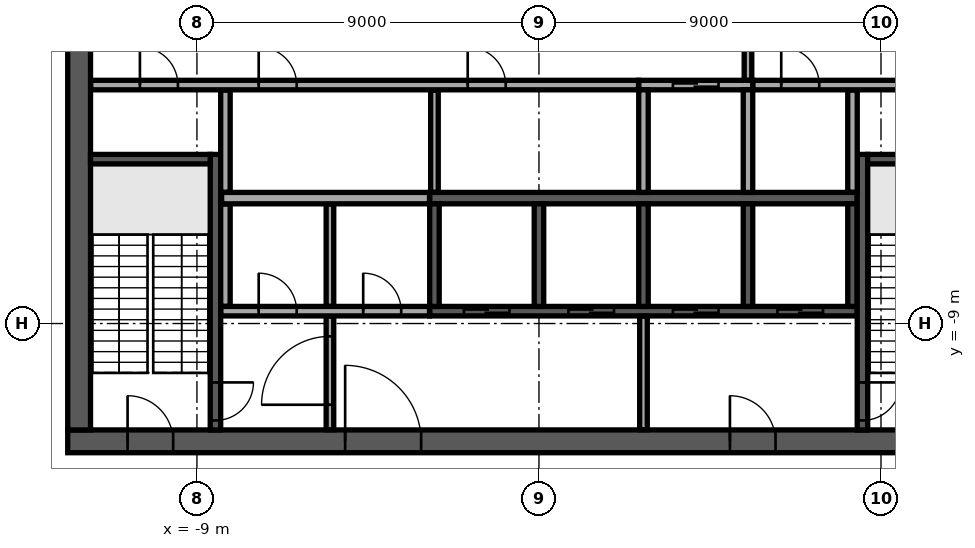
"""IFC4 building model, lengths in metres.
Left out: names, types, materials, properties, quantities, classifications, styles, units other than length and angle.
Written with IfcOpenShell. Run it as: python <this file> out.ifc"""

import sys

from ifc_helpers import new_model, si_unit, direction, frame, frame_2d, origin, place, context, subcontext, project, spatial, rectangle, extrude, element, fill, save


model = new_model("IFC4")
c1 = context("Model", 3, precision=1e-05, world=origin(), true_north=direction((0.0, 1.0)))
c2 = subcontext(c1, "Body", "Model", "MODEL_VIEW")
j1 = project(units=[si_unit("LENGTHUNIT", "METRE"), si_unit("PLANEANGLEUNIT", "RADIAN")], contexts=[c1])
p1 = place(None, origin())
s1 = spatial("IfcSite", under=j1, at=p1, CompositionType="ELEMENT")
p2 = place(p1, origin())
s2 = spatial("IfcBuilding", under=s1, at=p2, CompositionType="ELEMENT")
p3 = place(p2, frame((0.0, 0.0, 368.1)))
s3 = spatial("IfcBuildingStorey", under=s2, at=p3, CompositionType="ELEMENT", Elevation=368.1)
p4 = place(p3, frame((-12.4, -12.1, 0.0), z_axis=(0.0, 0.0, 1.0), x_axis=(1.0, 0.0, 0.0)))
e1 = element("IfcWall", 1, at=p4, inside=s3, PredefinedType="SHEAR", context=c2, shape_type="SweptSolid", body=[
    extrude(rectangle(XDim=24.8, YDim=0.6, at=frame_2d((12.4, 0.0))), origin(), (0.0, 0.0, 1.0), 4.7),
])
p5 = place(p4, frame((7.3, 0.0, 0.0)))
e2 = element("IfcOpeningElement", 2, at=p5, cuts=e1, PredefinedType="OPENING", context=c2, shape_type="SweptSolid", body=[
    extrude(rectangle(XDim=2.0, YDim=2.1, at=frame_2d((1.0, 1.05))), frame((0.0, 0.31, 0.0), z_axis=(0.0, -1.0, 0.0), x_axis=(1.0, 0.0, 0.0)), (0.0, 0.0, 1.0), 0.62),
])
p6 = place(p4, frame((17.425, 0.0, 0.0)))
e3 = element("IfcOpeningElement", 3, at=p6, cuts=e1, PredefinedType="OPENING", context=c2, shape_type="SweptSolid", body=[
    extrude(rectangle(XDim=1.2, YDim=2.1, at=frame_2d((0.6, 1.05))), frame((0.0, 0.31, 0.0), z_axis=(0.0, -1.0, 0.0), x_axis=(1.0, 0.0, 0.0)), (0.0, 0.0, 1.0), 0.62),
])
p7 = place(p4, frame((1.575, 0.0, 0.0)))
e4 = element("IfcOpeningElement", 4, at=p7, cuts=e1, PredefinedType="OPENING", context=c2, shape_type="SweptSolid", body=[
    extrude(rectangle(XDim=1.2, YDim=2.1, at=frame_2d((0.6, 1.05))), frame((0.0, 0.31, 0.0), z_axis=(0.0, -1.0, 0.0), x_axis=(1.0, 0.0, 0.0)), (0.0, 0.0, 1.0), 0.62),
])
p8 = place(p4, frame((22.025, 0.0, 0.0)))
e5 = element("IfcOpeningElement", 5, at=p8, cuts=e1, PredefinedType="OPENING", context=c2, shape_type="SweptSolid", body=[
    extrude(rectangle(XDim=1.2, YDim=2.1, at=frame_2d((0.6, 1.05))), frame((0.0, 0.31, 0.0), z_axis=(0.0, -1.0, 0.0), x_axis=(1.0, 0.0, 0.0)), (0.0, 0.0, 1.0), 0.62),
])
p9 = place(p3, frame((-12.1, -11.8, 0.0), z_axis=(0.0, 0.0, 1.0), x_axis=(0.0, 1.0, 0.0)))
e6 = element("IfcWall", 6, at=p9, inside=s3, PredefinedType="SHEAR", context=c2, shape_type="SweptSolid", body=[
    extrude(rectangle(XDim=23.6, YDim=0.6, at=frame_2d((11.8, 0.0))), origin(), (0.0, 0.0, 1.0), 4.7),
])
p10 = place(p9, frame((10.6, 0.0, 0.0)))
e7 = element("IfcOpeningElement", 7, at=p10, cuts=e6, PredefinedType="OPENING", context=c2, shape_type="SweptSolid", body=[
    extrude(rectangle(XDim=2.4, YDim=2.4, at=frame_2d((1.2, 1.2))), frame((0.0, 0.31, 0.0), z_axis=(0.0, -1.0, 0.0), x_axis=(1.0, 0.0, 0.0)), (0.0, 0.0, 1.0), 0.62),
])
p11 = place(p3, frame((-2.875, -5.7, 0.0), z_axis=(0.0, 0.0, 1.0), x_axis=(1.0, 0.0, 0.0)))
e8 = element("IfcWall", 8, at=p11, inside=s3, PredefinedType="SOLIDWALL", context=c2, shape_type="SweptSolid", body=[
    extrude(rectangle(XDim=11.25, YDim=0.3, at=frame_2d((5.625, 0.0))), origin(), (0.0, 0.0, 1.0), 4.7),
])
p12 = place(p3, frame((2.625, -2.725, 0.0), z_axis=(0.0, 0.0, 1.0), x_axis=(1.0, 0.0, 0.0)))
e9 = element("IfcWall", 9, at=p12, inside=s3, PredefinedType="SOLIDWALL", context=c2, shape_type="SweptSolid", body=[
    extrude(rectangle(XDim=3.0, YDim=0.25, at=frame_2d((1.5, 0.0))), origin(), (0.0, 0.0, 1.0), 4.7),
])
p13 = place(p12, frame((0.9, 0.0, 0.0)))
e10 = element("IfcOpeningElement", 10, at=p13, cuts=e9, PredefinedType="OPENING", context=c2, shape_type="SweptSolid", body=[
    extrude(rectangle(XDim=1.2, YDim=2.1, at=frame_2d((0.6, 1.05))), frame((0.0, 0.135, 0.0), z_axis=(0.0, -1.0, 0.0), x_axis=(1.0, 0.0, 0.0)), (0.0, 0.0, 1.0), 0.27),
])
for number, where, z_axis, x_axis in (
    (11, (2.75, -5.55, 0.0), (0.0, 0.0, 1.0), (0.0, 1.0, 0.0)),
    (12, (5.5, -5.55, 0.0), (0.0, 0.0, 1.0), (0.0, 1.0, 0.0)),
):
    element("IfcWall", number, at=place(p3, frame(where, z_axis=z_axis, x_axis=x_axis)), inside=s3, PredefinedType="SOLIDWALL", context=c2, shape_type="SweptSolid", body=[
        extrude(rectangle(XDim=2.7, YDim=0.25, at=frame_2d((1.35, 0.0))), origin(), (0.0, 0.0, 1.0), 4.7),
    ])
p14 = place(p3, frame((-2.875, -8.675, 0.0), z_axis=(0.0, 0.0, 1.0), x_axis=(1.0, 0.0, 0.0)))
e13 = element("IfcWall", 13, at=p14, inside=s3, PredefinedType="SOLIDWALL", context=c2, shape_type="SweptSolid", body=[
    extrude(rectangle(XDim=11.25, YDim=0.25, at=frame_2d((5.625, 0.0))), origin(), (0.0, 0.0, 1.0), 4.7),
])
p15 = place(p14, frame((0.9, 0.0, 0.0)))
e14 = element("IfcOpeningElement", 14, at=p15, cuts=e13, PredefinedType="OPENING", context=c2, shape_type="SweptSolid", body=[
    extrude(rectangle(XDim=1.2, YDim=2.1, at=frame_2d((0.6, 1.05))), frame((0.0, 0.135, 0.0), z_axis=(0.0, -1.0, 0.0), x_axis=(1.0, 0.0, 0.0)), (0.0, 0.0, 1.0), 0.27),
])
p16 = place(p14, frame((3.65, 0.0, 0.0)))
e15 = element("IfcOpeningElement", 15, at=p16, cuts=e13, PredefinedType="OPENING", context=c2, shape_type="SweptSolid", body=[
    extrude(rectangle(XDim=1.2, YDim=2.1, at=frame_2d((0.6, 1.05))), frame((0.0, 0.135, 0.0), z_axis=(0.0, -1.0, 0.0), x_axis=(1.0, 0.0, 0.0)), (0.0, 0.0, 1.0), 0.27),
])
p17 = place(p14, frame((6.4, 0.0, 0.0)))
e16 = element("IfcOpeningElement", 16, at=p17, cuts=e13, PredefinedType="OPENING", context=c2, shape_type="SweptSolid", body=[
    extrude(rectangle(XDim=1.2, YDim=2.1, at=frame_2d((0.6, 1.05))), frame((0.0, 0.135, 0.0), z_axis=(0.0, -1.0, 0.0), x_axis=(1.0, 0.0, 0.0)), (0.0, 0.0, 1.0), 0.27),
])
p18 = place(p14, frame((9.15, 0.0, 0.0)))
e17 = element("IfcOpeningElement", 17, at=p18, cuts=e13, PredefinedType="OPENING", context=c2, shape_type="SweptSolid", body=[
    extrude(rectangle(XDim=1.2, YDim=2.1, at=frame_2d((0.6, 1.05))), frame((0.0, 0.135, 0.0), z_axis=(0.0, -1.0, 0.0), x_axis=(1.0, 0.0, 0.0)), (0.0, 0.0, 1.0), 0.27),
])
for number, where, z_axis, x_axis in (
    (18, (-2.75, -8.55, 0.0), (0.0, 0.0, 1.0), (0.0, 1.0, 0.0)),
    (19, (0.0, -8.55, 0.0), (0.0, 0.0, 1.0), (0.0, 1.0, 0.0)),
    (20, (2.75, -8.55, 0.0), (0.0, 0.0, 1.0), (0.0, 1.0, 0.0)),
    (21, (5.5, -8.55, 0.0), (0.0, 0.0, 1.0), (0.0, 1.0, 0.0)),
    (22, (8.25, -8.55, 0.0), (0.0, 0.0, 1.0), (0.0, 1.0, 0.0)),
):
    element("IfcWall", number, at=place(p3, frame(where, z_axis=z_axis, x_axis=x_axis)), inside=s3, PredefinedType="SOLIDWALL", context=c2, shape_type="SweptSolid", body=[
        extrude(rectangle(XDim=2.7, YDim=0.25, at=frame_2d((1.35, 0.0))), origin(), (0.0, 0.0, 1.0), 4.7),
    ])
p19 = place(p3, frame((-8.512, -4.55, 0.0), z_axis=(0.0, 0.0, 1.0), x_axis=(0.0, -1.0, 0.0)))
e23 = element("IfcWall", 23, at=p19, inside=s3, PredefinedType="SOLIDWALL", context=c2, shape_type="SweptSolid", body=[
    extrude(rectangle(XDim=7.25, YDim=0.275, at=frame_2d((3.625, 0.0))), origin(), (0.0, 0.0, 1.0), 4.7),
])
p20 = place(p19, frame((6.0, 0.0, 0.0)))
e24 = element("IfcOpeningElement", 24, at=p20, cuts=e23, PredefinedType="OPENING", context=c2, shape_type="SweptSolid", body=[
    extrude(rectangle(XDim=1.0, YDim=2.1, at=frame_2d((0.5, 1.05))), frame((0.0, 0.147, 0.0), z_axis=(0.0, -1.0, 0.0), x_axis=(1.0, 0.0, 0.0)), (0.0, 0.0, 1.0), 0.295),
])
p21 = place(p3, frame((-8.65, -4.675, 0.0), z_axis=(0.0, 0.0, 1.0), x_axis=(-1.0, 0.0, 0.0)))
e25 = element("IfcWall", 25, at=p21, inside=s3, PredefinedType="SOLIDWALL", context=c2, shape_type="SweptSolid", body=[
    extrude(rectangle(XDim=3.15, YDim=0.25, at=frame_2d((1.575, 0.0))), origin(), (0.0, 0.0, 1.0), 4.7),
])
p22 = place(p3, frame((8.512, -4.55, 0.0), z_axis=(0.0, 0.0, 1.0), x_axis=(0.0, -1.0, 0.0)))
e26 = element("IfcWall", 26, at=p22, inside=s3, PredefinedType="SOLIDWALL", context=c2, shape_type="SweptSolid", body=[
    extrude(rectangle(XDim=7.25, YDim=0.275, at=frame_2d((3.625, 0.0))), origin(), (0.0, 0.0, 1.0), 4.7),
])
p23 = place(p22, frame((6.0, 0.0, 0.0)))
e27 = element("IfcOpeningElement", 27, at=p23, cuts=e26, PredefinedType="OPENING", context=c2, shape_type="SweptSolid", body=[
    extrude(rectangle(XDim=1.0, YDim=2.1, at=frame_2d((0.5, 1.05))), frame((0.0, 0.147, 0.0), z_axis=(0.0, -1.0, 0.0), x_axis=(1.0, 0.0, 0.0)), (0.0, 0.0, 1.0), 0.295),
])
p24 = place(p3, frame((8.65, -4.675, 0.0), z_axis=(0.0, 0.0, 1.0), x_axis=(1.0, 0.0, 0.0)))
e28 = element("IfcWall", 28, at=p24, inside=s3, PredefinedType="SOLIDWALL", context=c2, shape_type="SweptSolid", body=[
    extrude(rectangle(XDim=3.15, YDim=0.25, at=frame_2d((1.575, 0.0))), origin(), (0.0, 0.0, 1.0), 4.7),
])
p25 = place(p3, frame((-5.5, -11.795, 0.0), z_axis=(0.0, 0.0, 1.0), x_axis=(0.0, 1.0, 0.0)))
e29 = element("IfcWall", 29, at=p25, inside=s3, PredefinedType="PARTITIONING", context=c2, shape_type="SweptSolid", body=[
    extrude(rectangle(XDim=2.99, YDim=0.2, at=frame_2d((1.495, 0.0))), origin(), (0.0, 0.0, 1.0), 4.7),
])
p26 = place(p25, frame((0.657, 0.0, 0.0)))
e30 = element("IfcOpeningElement", 30, at=p26, cuts=e29, PredefinedType="OPENING", context=c2, shape_type="SweptSolid", body=[
    extrude(rectangle(XDim=1.8, YDim=2.1, at=frame_2d((0.9, 1.05))), frame((0.0, 0.11, 0.0), z_axis=(0.0, -1.0, 0.0), x_axis=(1.0, 0.0, 0.0)), (0.0, 0.0, 1.0), 0.22),
])
p27 = place(p3, frame((2.75, -11.795, 0.0), z_axis=(0.0, 0.0, 1.0), x_axis=(0.0, 1.0, 0.0)))
e31 = element("IfcWall", 31, at=p27, inside=s3, PredefinedType="PARTITIONING", context=c2, shape_type="SweptSolid", body=[
    extrude(rectangle(XDim=2.99, YDim=0.2, at=frame_2d((1.495, 0.0))), origin(), (0.0, 0.0, 1.0), 4.7),
])
p28 = place(p3, frame((-8.37, -8.675, 0.0), z_axis=(0.0, 0.0, 1.0), x_axis=(1.0, 0.0, 0.0)))
e32 = element("IfcWall", 32, at=p28, inside=s3, PredefinedType="PARTITIONING", context=c2, shape_type="SweptSolid", body=[
    extrude(rectangle(XDim=5.49, YDim=0.25, at=frame_2d((2.745, 0.0))), origin(), (0.0, 0.0, 1.0), 4.7),
])
p29 = place(p28, frame((0.995, 0.0, 0.0)))
e33 = element("IfcOpeningElement", 33, at=p29, cuts=e32, PredefinedType="OPENING", context=c2, shape_type="SweptSolid", body=[
    extrude(rectangle(XDim=1.0, YDim=2.1, at=frame_2d((0.5, 1.05))), frame((0.0, 0.135, 0.0), z_axis=(0.0, -1.0, 0.0), x_axis=(1.0, 0.0, 0.0)), (0.0, 0.0, 1.0), 0.27),
])
p30 = place(p28, frame((3.745, 0.0, 0.0)))
e34 = element("IfcOpeningElement", 34, at=p30, cuts=e32, PredefinedType="OPENING", context=c2, shape_type="SweptSolid", body=[
    extrude(rectangle(XDim=1.0, YDim=2.1, at=frame_2d((0.5, 1.05))), frame((0.0, 0.135, 0.0), z_axis=(0.0, -1.0, 0.0), x_axis=(1.0, 0.0, 0.0)), (0.0, 0.0, 1.0), 0.27),
])
p31 = place(p3, frame((-8.25, -8.545, 0.0), z_axis=(0.0, 0.0, 1.0), x_axis=(0.0, 1.0, 0.0)))
e35 = element("IfcWall", 35, at=p31, inside=s3, PredefinedType="PARTITIONING", context=c2, shape_type="SweptSolid", body=[
    extrude(rectangle(XDim=2.69, YDim=0.25, at=frame_2d((1.345, 0.0))), origin(), (0.0, 0.0, 1.0), 4.7),
])
p32 = place(p3, frame((-5.5, -8.545, 0.0), z_axis=(0.0, 0.0, 1.0), x_axis=(0.0, 1.0, 0.0)))
e36 = element("IfcWall", 36, at=p32, inside=s3, PredefinedType="PARTITIONING", context=c2, shape_type="SweptSolid", body=[
    extrude(rectangle(XDim=2.69, YDim=0.2, at=frame_2d((1.345, 0.0))), origin(), (0.0, 0.0, 1.0), 4.7),
])
p33 = place(p3, frame((-8.35, -5.7, 0.0), z_axis=(0.0, 0.0, 1.0), x_axis=(1.0, 0.0, 0.0)))
e37 = element("IfcWall", 37, at=p33, inside=s3, PredefinedType="PARTITIONING", context=c2, shape_type="SweptSolid", body=[
    extrude(rectangle(XDim=5.47, YDim=0.3, at=frame_2d((2.735, 0.0))), origin(), (0.0, 0.0, 1.0), 4.7),
])
p34 = place(p3, frame((-8.25, -5.545, 0.0), z_axis=(0.0, 0.0, 1.0), x_axis=(0.0, 1.0, 0.0)))
e38 = element("IfcWall", 38, at=p34, inside=s3, PredefinedType="PARTITIONING", context=c2, shape_type="SweptSolid", body=[
    extrude(rectangle(XDim=2.69, YDim=0.25, at=frame_2d((1.345, 0.0))), origin(), (0.0, 0.0, 1.0), 4.7),
])
p35 = place(p3, frame((-2.75, -5.545, 0.0), z_axis=(0.0, 0.0, 1.0), x_axis=(0.0, 1.0, 0.0)))
e39 = element("IfcWall", 39, at=p35, inside=s3, PredefinedType="PARTITIONING", context=c2, shape_type="SweptSolid", body=[
    extrude(rectangle(XDim=2.69, YDim=0.2, at=frame_2d((1.345, 0.0))), origin(), (0.0, 0.0, 1.0), 4.7),
])
p36 = place(p3, frame((8.25, -5.545, 0.0), z_axis=(0.0, 0.0, 1.0), x_axis=(0.0, 1.0, 0.0)))
e40 = element("IfcWall", 40, at=p36, inside=s3, PredefinedType="PARTITIONING", context=c2, shape_type="SweptSolid", body=[
    extrude(rectangle(XDim=2.69, YDim=0.25, at=frame_2d((1.345, 0.0))), origin(), (0.0, 0.0, 1.0), 4.7),
])
p37 = place(p3, frame((-11.795, -2.725, 0.0), z_axis=(0.0, 0.0, 1.0), x_axis=(1.0, 0.0, 0.0)))
e41 = element("IfcWall", 41, at=p37, inside=s3, PredefinedType="PARTITIONING", context=c2, shape_type="SweptSolid", body=[
    extrude(rectangle(XDim=14.415, YDim=0.25, at=frame_2d((7.208, 0.0))), origin(), (0.0, 0.0, 1.0), 4.7),
])
p38 = place(p37, frame((1.295, 0.0, 0.0)))
e42 = element("IfcOpeningElement", 42, at=p38, cuts=e41, PredefinedType="OPENING", context=c2, shape_type="SweptSolid", body=[
    extrude(rectangle(XDim=1.0, YDim=2.1, at=frame_2d((0.5, 1.05))), frame((0.0, 0.135, 0.0), z_axis=(0.0, -1.0, 0.0), x_axis=(1.0, 0.0, 0.0)), (0.0, 0.0, 1.0), 0.27),
])
p39 = place(p37, frame((4.42, 0.0, 0.0)))
e43 = element("IfcOpeningElement", 43, at=p39, cuts=e41, PredefinedType="OPENING", context=c2, shape_type="SweptSolid", body=[
    extrude(rectangle(XDim=1.0, YDim=2.1, at=frame_2d((0.5, 1.05))), frame((0.0, 0.135, 0.0), z_axis=(0.0, -1.0, 0.0), x_axis=(1.0, 0.0, 0.0)), (0.0, 0.0, 1.0), 0.27),
])
p40 = place(p37, frame((9.92, 0.0, 0.0)))
e44 = element("IfcOpeningElement", 44, at=p40, cuts=e41, PredefinedType="OPENING", context=c2, shape_type="SweptSolid", body=[
    extrude(rectangle(XDim=1.0, YDim=2.1, at=frame_2d((0.5, 1.05))), frame((0.0, 0.135, 0.0), z_axis=(0.0, -1.0, 0.0), x_axis=(1.0, 0.0, 0.0)), (0.0, 0.0, 1.0), 0.27),
])
p41 = place(p3, frame((5.63, -2.725, 0.0), z_axis=(0.0, 0.0, 1.0), x_axis=(1.0, 0.0, 0.0)))
e45 = element("IfcWall", 45, at=p41, inside=s3, PredefinedType="PARTITIONING", context=c2, shape_type="SweptSolid", body=[
    extrude(rectangle(XDim=6.165, YDim=0.25, at=frame_2d((3.083, 0.0))), origin(), (0.0, 0.0, 1.0), 4.7),
])
p42 = place(p41, frame((0.745, 0.0, 0.0)))
e46 = element("IfcOpeningElement", 46, at=p42, cuts=e45, PredefinedType="OPENING", context=c2, shape_type="SweptSolid", body=[
    extrude(rectangle(XDim=1.0, YDim=2.1, at=frame_2d((0.5, 1.05))), frame((0.0, 0.135, 0.0), z_axis=(0.0, -1.0, 0.0), x_axis=(1.0, 0.0, 0.0)), (0.0, 0.0, 1.0), 0.27),
])
p43 = place(p41, frame((3.92, 0.0, 0.0)))
e47 = element("IfcOpeningElement", 47, at=p43, cuts=e45, PredefinedType="OPENING", context=c2, shape_type="SweptSolid", body=[
    extrude(rectangle(XDim=0.9, YDim=2.1, at=frame_2d((0.45, 1.05))), frame((0.0, 0.135, 0.0), z_axis=(0.0, -1.0, 0.0), x_axis=(1.0, 0.0, 0.0)), (0.0, 0.0, 1.0), 0.27),
])
p44 = place(p3, frame((5.5, -2.595, 0.0), z_axis=(0.0, 0.0, 1.0), x_axis=(0.0, 1.0, 0.0)))
e48 = element("IfcWall", 48, at=p44, inside=s3, PredefinedType="PARTITIONING", context=c2, shape_type="SweptSolid", body=[
    extrude(rectangle(XDim=5.19, YDim=0.2, at=frame_2d((2.595, 0.0))), origin(), (0.0, 0.0, 1.0), 4.7),
])
p45 = place(p44, frame((1.395, 0.0, 0.0)))
e49 = element("IfcOpeningElement", 49, at=p45, cuts=e48, PredefinedType="OPENING", context=c2, shape_type="SweptSolid", body=[
    extrude(rectangle(XDim=2.4, YDim=2.4, at=frame_2d((1.2, 1.2))), frame((0.0, 0.11, 0.0), z_axis=(0.0, -1.0, 0.0), x_axis=(1.0, 0.0, 0.0)), (0.0, 0.0, 1.0), 0.22),
])
p46 = place(p5, origin())
e50 = element("IfcDoor", 50, at=p46, inside=s3, OperationType="SINGLE_SWING_LEFT", PredefinedType="DOOR", context=c2, shape_type="SweptSolid", body=[
    extrude(rectangle(XDim=2.0, YDim=2.1, at=frame_2d((1.0, 1.05))), frame((0.0, 0.025, 0.0), z_axis=(0.0, -1.0, 0.0), x_axis=(1.0, 0.0, 0.0)), (0.0, 0.0, 1.0), 0.05),
])
fill(e2, e50)
p47 = place(p6, origin())
e51 = element("IfcDoor", 51, at=p47, inside=s3, OperationType="SINGLE_SWING_LEFT", PredefinedType="DOOR", context=c2, shape_type="SweptSolid", body=[
    extrude(rectangle(XDim=1.2, YDim=2.1, at=frame_2d((0.6, 1.05))), frame((0.0, 0.025, 0.0), z_axis=(0.0, -1.0, 0.0), x_axis=(1.0, 0.0, 0.0)), (0.0, 0.0, 1.0), 0.05),
])
fill(e3, e51)
p48 = place(p7, origin())
e52 = element("IfcDoor", 52, at=p48, inside=s3, OperationType="SINGLE_SWING_LEFT", PredefinedType="DOOR", context=c2, shape_type="SweptSolid", body=[
    extrude(rectangle(XDim=1.2, YDim=2.1, at=frame_2d((0.6, 1.05))), frame((0.0, 0.025, 0.0), z_axis=(0.0, -1.0, 0.0), x_axis=(1.0, 0.0, 0.0)), (0.0, 0.0, 1.0), 0.05),
])
fill(e4, e52)
p49 = place(p13, origin())
e53 = element("IfcDoor", 53, at=p49, inside=s3, OperationType="DOUBLE_DOOR_SLIDING", PredefinedType="DOOR", context=c2, shape_type="SweptSolid", body=[
    extrude(rectangle(XDim=1.2, YDim=2.1, at=frame_2d((0.6, 1.05))), frame((0.0, 0.025, 0.0), z_axis=(0.0, -1.0, 0.0), x_axis=(1.0, 0.0, 0.0)), (0.0, 0.0, 1.0), 0.05),
])
fill(e10, e53)
p50 = place(p15, origin())
e54 = element("IfcDoor", 54, at=p50, inside=s3, OperationType="DOUBLE_DOOR_SLIDING", PredefinedType="DOOR", context=c2, shape_type="SweptSolid", body=[
    extrude(rectangle(XDim=1.2, YDim=2.1, at=frame_2d((0.6, 1.05))), frame((0.0, 0.025, 0.0), z_axis=(0.0, -1.0, 0.0), x_axis=(1.0, 0.0, 0.0)), (0.0, 0.0, 1.0), 0.05),
])
fill(e14, e54)
p51 = place(p16, origin())
e55 = element("IfcDoor", 55, at=p51, inside=s3, OperationType="DOUBLE_DOOR_SLIDING", PredefinedType="DOOR", context=c2, shape_type="SweptSolid", body=[
    extrude(rectangle(XDim=1.2, YDim=2.1, at=frame_2d((0.6, 1.05))), frame((0.0, 0.025, 0.0), z_axis=(0.0, -1.0, 0.0), x_axis=(1.0, 0.0, 0.0)), (0.0, 0.0, 1.0), 0.05),
])
fill(e15, e55)
p52 = place(p17, origin())
e56 = element("IfcDoor", 56, at=p52, inside=s3, OperationType="DOUBLE_DOOR_SLIDING", PredefinedType="DOOR", context=c2, shape_type="SweptSolid", body=[
    extrude(rectangle(XDim=1.2, YDim=2.1, at=frame_2d((0.6, 1.05))), frame((0.0, 0.025, 0.0), z_axis=(0.0, -1.0, 0.0), x_axis=(1.0, 0.0, 0.0)), (0.0, 0.0, 1.0), 0.05),
])
fill(e16, e56)
p53 = place(p18, origin())
e57 = element("IfcDoor", 57, at=p53, inside=s3, OperationType="DOUBLE_DOOR_SLIDING", PredefinedType="DOOR", context=c2, shape_type="SweptSolid", body=[
    extrude(rectangle(XDim=1.2, YDim=2.1, at=frame_2d((0.6, 1.05))), frame((0.0, 0.025, 0.0), z_axis=(0.0, -1.0, 0.0), x_axis=(1.0, 0.0, 0.0)), (0.0, 0.0, 1.0), 0.05),
])
fill(e17, e57)
p54 = place(p20, origin())
e58 = element("IfcDoor", 58, at=p54, inside=s3, OperationType="SINGLE_SWING_LEFT", PredefinedType="DOOR", context=c2, shape_type="SweptSolid", body=[
    extrude(rectangle(XDim=1.0, YDim=2.1, at=frame_2d((0.5, 1.05))), frame((0.0, 0.025, 0.0), z_axis=(0.0, -1.0, 0.0), x_axis=(1.0, 0.0, 0.0)), (0.0, 0.0, 1.0), 0.05),
])
fill(e24, e58)
p55 = place(p23, origin())
e59 = element("IfcDoor", 59, at=p55, inside=s3, OperationType="SINGLE_SWING_LEFT", PredefinedType="DOOR", context=c2, shape_type="SweptSolid", body=[
    extrude(rectangle(XDim=1.0, YDim=2.1, at=frame_2d((0.5, 1.05))), frame((0.0, 0.025, 0.0), z_axis=(0.0, -1.0, 0.0), x_axis=(1.0, 0.0, 0.0)), (0.0, 0.0, 1.0), 0.05),
])
fill(e27, e59)
p56 = place(p29, origin())
e60 = element("IfcDoor", 60, at=p56, inside=s3, OperationType="SINGLE_SWING_LEFT", PredefinedType="DOOR", context=c2, shape_type="SweptSolid", body=[
    extrude(rectangle(XDim=1.0, YDim=2.1, at=frame_2d((0.5, 1.05))), frame((0.0, 0.025, 0.0), z_axis=(0.0, -1.0, 0.0), x_axis=(1.0, 0.0, 0.0)), (0.0, 0.0, 1.0), 0.05),
])
fill(e33, e60)
p57 = place(p30, origin())
e61 = element("IfcDoor", 61, at=p57, inside=s3, OperationType="SINGLE_SWING_LEFT", PredefinedType="DOOR", context=c2, shape_type="SweptSolid", body=[
    extrude(rectangle(XDim=1.0, YDim=2.1, at=frame_2d((0.5, 1.05))), frame((0.0, 0.025, 0.0), z_axis=(0.0, -1.0, 0.0), x_axis=(1.0, 0.0, 0.0)), (0.0, 0.0, 1.0), 0.05),
])
fill(e34, e61)
p58 = place(p38, origin())
e62 = element("IfcDoor", 62, at=p58, inside=s3, OperationType="SINGLE_SWING_LEFT", PredefinedType="DOOR", context=c2, shape_type="SweptSolid", body=[
    extrude(rectangle(XDim=1.0, YDim=2.1, at=frame_2d((0.5, 1.05))), frame((0.0, 0.025, 0.0), z_axis=(0.0, -1.0, 0.0), x_axis=(1.0, 0.0, 0.0)), (0.0, 0.0, 1.0), 0.05),
])
fill(e42, e62)
p59 = place(p42, origin())
e63 = element("IfcDoor", 63, at=p59, inside=s3, OperationType="SINGLE_SWING_LEFT", PredefinedType="DOOR", context=c2, shape_type="SweptSolid", body=[
    extrude(rectangle(XDim=1.0, YDim=2.1, at=frame_2d((0.5, 1.05))), frame((0.0, 0.025, 0.0), z_axis=(0.0, -1.0, 0.0), x_axis=(1.0, 0.0, 0.0)), (0.0, 0.0, 1.0), 0.05),
])
fill(e46, e63)
p60 = place(p39, origin())
e64 = element("IfcDoor", 64, at=p60, inside=s3, OperationType="SINGLE_SWING_LEFT", PredefinedType="DOOR", context=c2, shape_type="SweptSolid", body=[
    extrude(rectangle(XDim=1.0, YDim=2.1, at=frame_2d((0.5, 1.05))), frame((0.0, 0.025, 0.0), z_axis=(0.0, -1.0, 0.0), x_axis=(1.0, 0.0, 0.0)), (0.0, 0.0, 1.0), 0.05),
])
fill(e43, e64)
p61 = place(p40, origin())
e65 = element("IfcDoor", 65, at=p61, inside=s3, OperationType="SINGLE_SWING_LEFT", PredefinedType="DOOR", context=c2, shape_type="SweptSolid", body=[
    extrude(rectangle(XDim=1.0, YDim=2.1, at=frame_2d((0.5, 1.05))), frame((0.0, 0.025, 0.0), z_axis=(0.0, -1.0, 0.0), x_axis=(1.0, 0.0, 0.0)), (0.0, 0.0, 1.0), 0.05),
])
fill(e44, e65)
p62 = place(p26, origin())
e66 = element("IfcDoor", 66, at=p62, inside=s3, OperationType="SINGLE_SWING_LEFT", PredefinedType="DOOR", context=c2, shape_type="SweptSolid", body=[
    extrude(rectangle(XDim=1.8, YDim=2.1, at=frame_2d((0.9, 1.05))), frame((0.0, 0.025, 0.0), z_axis=(0.0, -1.0, 0.0), x_axis=(1.0, 0.0, 0.0)), (0.0, 0.0, 1.0), 0.05),
])
fill(e30, e66)
save(model, sys.argv[1])
